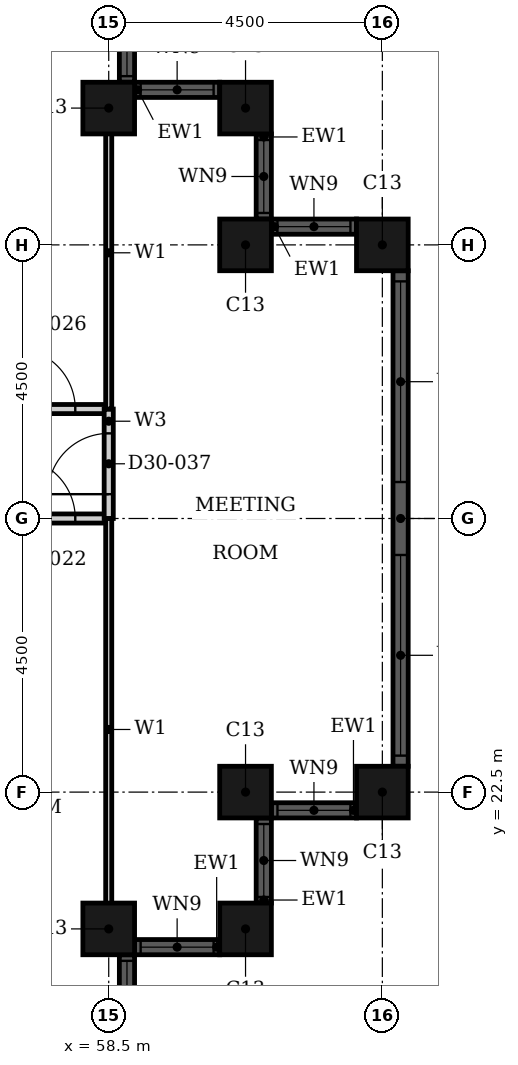
"""IFC4 building model, lengths in metres.
Left out: names, types, materials, properties, quantities, classifications, styles, units other than length and angle.
Written with IfcOpenShell. Run it as: python <this file> out.ifc"""

import sys

from ifc_helpers import new_model, si_unit, direction, frame, frame_2d, origin, origin_2d, place, context, subcontext, project, spatial, rectangle, hollow_rectangle, extrude, element, fill, save


model = new_model("IFC4")
c1 = context("Model", 3, precision=1e-05, world=origin(), true_north=direction((0.0, 1.0)))
c2 = subcontext(c1, "Body", "Model", "MODEL_VIEW")
j1 = project(units=[si_unit("LENGTHUNIT", "METRE"), si_unit("PLANEANGLEUNIT", "RADIAN")], contexts=[c1])
p1 = place(None, origin())
s1 = spatial("IfcSite", under=j1, at=p1, CompositionType="ELEMENT")
p2 = place(p1, origin())
s2 = spatial("IfcBuilding", under=s1, at=p2, CompositionType="ELEMENT")
p3 = place(p2, frame((0.0, 0.0, 122.4)))
s3 = spatial("IfcBuildingStorey", under=s2, at=p3, CompositionType="ELEMENT", Elevation=122.4)
for number, where, z_axis, x_axis in (
    (1, (58.5, 20.25, 0.0), (0.0, 0.0, 1.0), (1.0, 0.0, 0.0)),
    (2, (60.75, 20.25, 0.0), (0.0, 0.0, 1.0), (1.0, 0.0, 0.0)),
    (3, (60.75, 22.5, 0.0), (0.0, 0.0, 1.0), (1.0, 0.0, 0.0)),
    (4, (63.0, 22.5, 0.0), (0.0, 0.0, 1.0), (1.0, 0.0, 0.0)),
    (5, (63.0, 31.5, 0.0), (0.0, 0.0, 1.0), (1.0, 0.0, 0.0)),
    (6, (60.75, 31.5, 0.0), (0.0, 0.0, 1.0), (1.0, 0.0, 0.0)),
    (7, (60.75, 33.75, 0.0), (0.0, 0.0, 1.0), (1.0, 0.0, 0.0)),
    (8, (58.5, 33.75, 0.0), (0.0, 0.0, 1.0), (1.0, 0.0, 0.0)),
):
    element("IfcColumn", number, at=place(p3, frame(where, z_axis=z_axis, x_axis=x_axis)), inside=s3, PredefinedType="COLUMN", context=c2, shape_type="SweptSolid", body=[
        extrude(hollow_rectangle(XDim=0.85, YDim=0.85, WallThickness=0.026, at=origin_2d()), origin(), (0.0, 0.0, 1.0), 3.6),
    ])
p4 = place(p3, frame((58.8, 18.425, 0.0), z_axis=(0.0, 0.0, 1.0), x_axis=(0.0, 1.0, 0.0)))
e9 = element("IfcWall", 9, at=p4, inside=s3, PredefinedType="SOLIDWALL", context=c2, shape_type="SweptSolid", body=[
    extrude(rectangle(XDim=1.4, YDim=0.25, at=frame_2d((0.7, 0.0))), origin(), (0.0, 0.0, 1.0), 3.6),
])
p5 = place(p4, frame((0.1, 0.0, 0.9)))
e10 = element("IfcOpeningElement", 10, at=p5, cuts=e9, PredefinedType="OPENING", context=c2, shape_type="SweptSolid", body=[
    extrude(rectangle(XDim=1.2, YDim=2.08, at=frame_2d((0.6, 1.04))), frame((0.0, 0.135, 0.0), z_axis=(0.0, -1.0, 0.0), x_axis=(1.0, 0.0, 0.0)), (0.0, 0.0, 1.0), 0.27),
])
p6 = place(p3, frame((58.925, 19.95, 0.0), z_axis=(0.0, 0.0, 1.0), x_axis=(1.0, 0.0, 0.0)))
e11 = element("IfcWall", 11, at=p6, inside=s3, PredefinedType="SOLIDWALL", context=c2, shape_type="SweptSolid", body=[
    extrude(rectangle(XDim=1.4, YDim=0.25, at=frame_2d((0.7, 0.0))), origin(), (0.0, 0.0, 1.0), 3.6),
])
p7 = place(p6, frame((0.1, 0.0, 0.9)))
e12 = element("IfcOpeningElement", 12, at=p7, cuts=e11, PredefinedType="OPENING", context=c2, shape_type="SweptSolid", body=[
    extrude(rectangle(XDim=1.2, YDim=2.08, at=frame_2d((0.6, 1.04))), frame((0.0, 0.135, 0.0), z_axis=(0.0, -1.0, 0.0), x_axis=(1.0, 0.0, 0.0)), (0.0, 0.0, 1.0), 0.27),
])
p8 = place(p3, frame((61.05, 20.675, 0.0), z_axis=(0.0, 0.0, 1.0), x_axis=(0.0, 1.0, 0.0)))
e13 = element("IfcWall", 13, at=p8, inside=s3, PredefinedType="SOLIDWALL", context=c2, shape_type="SweptSolid", body=[
    extrude(rectangle(XDim=1.4, YDim=0.25, at=frame_2d((0.7, 0.0))), origin(), (0.0, 0.0, 1.0), 3.6),
])
p9 = place(p8, frame((0.1, 0.0, 0.9)))
e14 = element("IfcOpeningElement", 14, at=p9, cuts=e13, PredefinedType="OPENING", context=c2, shape_type="SweptSolid", body=[
    extrude(rectangle(XDim=1.2, YDim=2.08, at=frame_2d((0.6, 1.04))), frame((0.0, 0.135, 0.0), z_axis=(0.0, -1.0, 0.0), x_axis=(1.0, 0.0, 0.0)), (0.0, 0.0, 1.0), 0.27),
])
p10 = place(p3, frame((61.175, 22.2, 0.0), z_axis=(0.0, 0.0, 1.0), x_axis=(1.0, 0.0, 0.0)))
e15 = element("IfcWall", 15, at=p10, inside=s3, PredefinedType="SOLIDWALL", context=c2, shape_type="SweptSolid", body=[
    extrude(rectangle(XDim=1.4, YDim=0.25, at=frame_2d((0.7, 0.0))), origin(), (0.0, 0.0, 1.0), 3.6),
])
p11 = place(p10, frame((0.1, 0.0, 0.9)))
e16 = element("IfcOpeningElement", 16, at=p11, cuts=e15, PredefinedType="OPENING", context=c2, shape_type="SweptSolid", body=[
    extrude(rectangle(XDim=1.2, YDim=2.08, at=frame_2d((0.6, 1.04))), frame((0.0, 0.135, 0.0), z_axis=(0.0, -1.0, 0.0), x_axis=(1.0, 0.0, 0.0)), (0.0, 0.0, 1.0), 0.27),
])
p12 = place(p3, frame((63.3, 22.925, 0.0), z_axis=(0.0, 0.0, 1.0), x_axis=(0.0, 1.0, 0.0)))
e17 = element("IfcWall", 17, at=p12, inside=s3, PredefinedType="SOLIDWALL", context=c2, shape_type="SweptSolid", body=[
    extrude(rectangle(XDim=8.15, YDim=0.25, at=frame_2d((4.075, 0.0))), origin(), (0.0, 0.0, 1.0), 3.6),
])
p13 = place(p12, frame((0.175, 0.0, 0.9)))
e18 = element("IfcOpeningElement", 18, at=p13, cuts=e17, PredefinedType="OPENING", context=c2, shape_type="SweptSolid", body=[
    extrude(rectangle(XDim=3.3, YDim=2.08, at=frame_2d((1.65, 1.04))), frame((0.0, 0.135, 0.0), z_axis=(0.0, -1.0, 0.0), x_axis=(1.0, 0.0, 0.0)), (0.0, 0.0, 1.0), 0.27),
])
p14 = place(p12, frame((4.675, 0.0, 0.9)))
e19 = element("IfcOpeningElement", 19, at=p14, cuts=e17, PredefinedType="OPENING", context=c2, shape_type="SweptSolid", body=[
    extrude(rectangle(XDim=3.3, YDim=2.08, at=frame_2d((1.65, 1.04))), frame((0.0, 0.135, 0.0), z_axis=(0.0, -1.0, 0.0), x_axis=(1.0, 0.0, 0.0)), (0.0, 0.0, 1.0), 0.27),
])
p15 = place(p3, frame((62.575, 31.8, 0.0), z_axis=(0.0, 0.0, 1.0), x_axis=(-1.0, 0.0, 0.0)))
e20 = element("IfcWall", 20, at=p15, inside=s3, PredefinedType="SOLIDWALL", context=c2, shape_type="SweptSolid", body=[
    extrude(rectangle(XDim=1.4, YDim=0.25, at=frame_2d((0.7, 0.0))), origin(), (0.0, 0.0, 1.0), 3.6),
])
p16 = place(p15, frame((0.1, 0.0, 0.9)))
e21 = element("IfcOpeningElement", 21, at=p16, cuts=e20, PredefinedType="OPENING", context=c2, shape_type="SweptSolid", body=[
    extrude(rectangle(XDim=1.2, YDim=2.08, at=frame_2d((0.6, 1.04))), frame((0.0, 0.135, 0.0), z_axis=(0.0, -1.0, 0.0), x_axis=(1.0, 0.0, 0.0)), (0.0, 0.0, 1.0), 0.27),
])
p17 = place(p3, frame((61.05, 31.925, 0.0), z_axis=(0.0, 0.0, 1.0), x_axis=(0.0, 1.0, 0.0)))
e22 = element("IfcWall", 22, at=p17, inside=s3, PredefinedType="SOLIDWALL", context=c2, shape_type="SweptSolid", body=[
    extrude(rectangle(XDim=1.4, YDim=0.25, at=frame_2d((0.7, 0.0))), origin(), (0.0, 0.0, 1.0), 3.6),
])
p18 = place(p17, frame((0.1, 0.0, 0.9)))
e23 = element("IfcOpeningElement", 23, at=p18, cuts=e22, PredefinedType="OPENING", context=c2, shape_type="SweptSolid", body=[
    extrude(rectangle(XDim=1.2, YDim=2.08, at=frame_2d((0.6, 1.04))), frame((0.0, 0.135, 0.0), z_axis=(0.0, -1.0, 0.0), x_axis=(1.0, 0.0, 0.0)), (0.0, 0.0, 1.0), 0.27),
])
p19 = place(p3, frame((60.325, 34.05, 0.0), z_axis=(0.0, 0.0, 1.0), x_axis=(-1.0, 0.0, 0.0)))
e24 = element("IfcWall", 24, at=p19, inside=s3, PredefinedType="SOLIDWALL", context=c2, shape_type="SweptSolid", body=[
    extrude(rectangle(XDim=1.4, YDim=0.25, at=frame_2d((0.7, 0.0))), origin(), (0.0, 0.0, 1.0), 3.6),
])
p20 = place(p19, frame((0.1, 0.0, 0.9)))
e25 = element("IfcOpeningElement", 25, at=p20, cuts=e24, PredefinedType="OPENING", context=c2, shape_type="SweptSolid", body=[
    extrude(rectangle(XDim=1.2, YDim=2.08, at=frame_2d((0.6, 1.04))), frame((0.0, 0.135, 0.0), z_axis=(0.0, -1.0, 0.0), x_axis=(1.0, 0.0, 0.0)), (0.0, 0.0, 1.0), 0.27),
])
p21 = place(p3, frame((58.8, 34.175, 0.0), z_axis=(0.0, 0.0, 1.0), x_axis=(0.0, 1.0, 0.0)))
e26 = element("IfcWall", 26, at=p21, inside=s3, PredefinedType="SOLIDWALL", context=c2, shape_type="SweptSolid", body=[
    extrude(rectangle(XDim=1.4, YDim=0.25, at=frame_2d((0.7, 0.0))), origin(), (0.0, 0.0, 1.0), 3.6),
])
p22 = place(p21, frame((0.1, 0.0, 0.9)))
e27 = element("IfcOpeningElement", 27, at=p22, cuts=e26, PredefinedType="OPENING", context=c2, shape_type="SweptSolid", body=[
    extrude(rectangle(XDim=1.2, YDim=2.08, at=frame_2d((0.6, 1.04))), frame((0.0, 0.135, 0.0), z_axis=(0.0, -1.0, 0.0), x_axis=(1.0, 0.0, 0.0)), (0.0, 0.0, 1.0), 0.27),
])
p23 = place(p3, frame((46.8, 27.0, 0.0), z_axis=(0.0, 0.0, 1.0), x_axis=(1.0, 0.0, 0.0)))
e28 = element("IfcWall", 28, at=p23, inside=s3, PredefinedType="PARTITIONING", context=c2, shape_type="SweptSolid", body=[
    extrude(rectangle(XDim=11.7, YDim=0.15, at=frame_2d((5.85, 0.0))), origin(), (0.0, 0.0, 1.0), 2.58),
])
p24 = place(p23, frame((5.65, 0.0, 0.0)))
e29 = element("IfcOpeningElement", 29, at=p24, cuts=e28, PredefinedType="OPENING", context=c2, shape_type="SweptSolid", body=[
    extrude(rectangle(XDim=1.0, YDim=2.1, at=frame_2d((0.5, 1.05))), frame((0.0, 0.085, 0.0), z_axis=(0.0, -1.0, 0.0), x_axis=(1.0, 0.0, 0.0)), (0.0, 0.0, 1.0), 0.17),
])
p25 = place(p23, frame((10.15, 0.0, 0.0)))
e30 = element("IfcOpeningElement", 30, at=p25, cuts=e28, PredefinedType="OPENING", context=c2, shape_type="SweptSolid", body=[
    extrude(rectangle(XDim=1.0, YDim=2.1, at=frame_2d((0.5, 1.05))), frame((0.0, 0.085, 0.0), z_axis=(0.0, -1.0, 0.0), x_axis=(1.0, 0.0, 0.0)), (0.0, 0.0, 1.0), 0.17),
])
p26 = place(p3, frame((46.8, 28.8, 0.0), z_axis=(0.0, 0.0, 1.0), x_axis=(1.0, 0.0, 0.0)))
e31 = element("IfcWall", 31, at=p26, inside=s3, PredefinedType="PARTITIONING", context=c2, shape_type="SweptSolid", body=[
    extrude(rectangle(XDim=11.7, YDim=0.15, at=frame_2d((5.85, 0.0))), origin(), (0.0, 0.0, 1.0), 3.3),
])
p27 = place(p26, frame((5.65, 0.0, 0.0)))
e32 = element("IfcOpeningElement", 32, at=p27, cuts=e31, PredefinedType="OPENING", context=c2, shape_type="SweptSolid", body=[
    extrude(rectangle(XDim=1.0, YDim=2.1, at=frame_2d((0.5, 1.05))), frame((0.0, 0.085, 0.0), z_axis=(0.0, -1.0, 0.0), x_axis=(1.0, 0.0, 0.0)), (0.0, 0.0, 1.0), 0.17),
])
p28 = place(p26, frame((10.15, 0.0, 0.0)))
e33 = element("IfcOpeningElement", 33, at=p28, cuts=e31, PredefinedType="OPENING", context=c2, shape_type="SweptSolid", body=[
    extrude(rectangle(XDim=1.0, YDim=2.1, at=frame_2d((0.5, 1.05))), frame((0.0, 0.085, 0.0), z_axis=(0.0, -1.0, 0.0), x_axis=(1.0, 0.0, 0.0)), (0.0, 0.0, 1.0), 0.17),
])
p29 = place(p3, frame((58.5, 27.0, 0.0), z_axis=(0.0, 0.0, 1.0), x_axis=(0.0, 1.0, 0.0)))
e34 = element("IfcWall", 34, at=p29, inside=s3, PredefinedType="PARTITIONING", context=c2, shape_type="SweptSolid", body=[
    extrude(rectangle(XDim=1.8, YDim=0.15, at=frame_2d((0.9, 0.0))), origin(), (0.0, 0.0, 1.0), 3.3),
])
p30 = place(p29, frame((0.4, 0.0, 0.0)))
e35 = element("IfcOpeningElement", 35, at=p30, cuts=e34, PredefinedType="OPENING", context=c2, shape_type="SweptSolid", body=[
    extrude(rectangle(XDim=1.0, YDim=2.1, at=frame_2d((0.5, 1.05))), frame((0.0, 0.085, 0.0), z_axis=(0.0, -1.0, 0.0), x_axis=(1.0, 0.0, 0.0)), (0.0, 0.0, 1.0), 0.17),
])
p31 = place(p3, frame((58.5, 28.8, 0.0), z_axis=(0.0, 0.0, 1.0), x_axis=(0.0, 1.0, 0.0)))
e36 = element("IfcWall", 36, at=p31, inside=s3, PredefinedType="PARTITIONING", context=c2, shape_type="SweptSolid", body=[
    extrude(rectangle(XDim=5.14, YDim=0.1, at=frame_2d((2.57, 0.0))), origin(), (0.0, 0.0, 1.0), 3.3),
])
p32 = place(p3, frame((58.5, 20.06, 0.0), z_axis=(0.0, 0.0, 1.0), x_axis=(0.0, 1.0, 0.0)))
e37 = element("IfcWall", 37, at=p32, inside=s3, PredefinedType="PARTITIONING", context=c2, shape_type="SweptSolid", body=[
    extrude(rectangle(XDim=6.94, YDim=0.1, at=frame_2d((3.47, 0.0))), origin(), (0.0, 0.0, 1.0), 3.3),
])
p33 = place(p5, origin())
e38 = element("IfcWindow", 38, at=p33, inside=s3, PartitioningType="SINGLE_PANEL", PredefinedType="WINDOW", context=c2, shape_type="SweptSolid", body=[
    extrude(rectangle(XDim=1.2, YDim=2.08, at=frame_2d((0.6, 1.04))), frame((0.0, 0.03, 0.0), z_axis=(0.0, -1.0, 0.0), x_axis=(1.0, 0.0, 0.0)), (0.0, 0.0, 1.0), 0.06),
])
fill(e10, e38)
p34 = place(p7, origin())
e39 = element("IfcWindow", 39, at=p34, inside=s3, PartitioningType="SINGLE_PANEL", PredefinedType="WINDOW", context=c2, shape_type="SweptSolid", body=[
    extrude(rectangle(XDim=1.2, YDim=2.08, at=frame_2d((0.6, 1.04))), frame((0.0, 0.03, 0.0), z_axis=(0.0, -1.0, 0.0), x_axis=(1.0, 0.0, 0.0)), (0.0, 0.0, 1.0), 0.06),
])
fill(e12, e39)
p35 = place(p9, origin())
e40 = element("IfcWindow", 40, at=p35, inside=s3, PartitioningType="SINGLE_PANEL", PredefinedType="WINDOW", context=c2, shape_type="SweptSolid", body=[
    extrude(rectangle(XDim=1.2, YDim=2.08, at=frame_2d((0.6, 1.04))), frame((0.0, 0.03, 0.0), z_axis=(0.0, -1.0, 0.0), x_axis=(1.0, 0.0, 0.0)), (0.0, 0.0, 1.0), 0.06),
])
fill(e14, e40)
p36 = place(p11, origin())
e41 = element("IfcWindow", 41, at=p36, inside=s3, PartitioningType="SINGLE_PANEL", PredefinedType="WINDOW", context=c2, shape_type="SweptSolid", body=[
    extrude(rectangle(XDim=1.2, YDim=2.08, at=frame_2d((0.6, 1.04))), frame((0.0, 0.03, 0.0), z_axis=(0.0, -1.0, 0.0), x_axis=(1.0, 0.0, 0.0)), (0.0, 0.0, 1.0), 0.06),
])
fill(e16, e41)
p37 = place(p13, origin())
e42 = element("IfcWindow", 42, at=p37, inside=s3, PartitioningType="SINGLE_PANEL", PredefinedType="WINDOW", context=c2, shape_type="SweptSolid", body=[
    extrude(rectangle(XDim=3.3, YDim=2.08, at=frame_2d((1.65, 1.04))), frame((0.0, 0.03, 0.0), z_axis=(0.0, -1.0, 0.0), x_axis=(1.0, 0.0, 0.0)), (0.0, 0.0, 1.0), 0.06),
])
fill(e18, e42)
p38 = place(p14, origin())
e43 = element("IfcWindow", 43, at=p38, inside=s3, PartitioningType="SINGLE_PANEL", PredefinedType="WINDOW", context=c2, shape_type="SweptSolid", body=[
    extrude(rectangle(XDim=3.3, YDim=2.08, at=frame_2d((1.65, 1.04))), frame((0.0, 0.03, 0.0), z_axis=(0.0, -1.0, 0.0), x_axis=(1.0, 0.0, 0.0)), (0.0, 0.0, 1.0), 0.06),
])
fill(e19, e43)
p39 = place(p16, origin())
e44 = element("IfcWindow", 44, at=p39, inside=s3, PartitioningType="SINGLE_PANEL", PredefinedType="WINDOW", context=c2, shape_type="SweptSolid", body=[
    extrude(rectangle(XDim=1.2, YDim=2.08, at=frame_2d((0.6, 1.04))), frame((0.0, 0.03, 0.0), z_axis=(0.0, -1.0, 0.0), x_axis=(1.0, 0.0, 0.0)), (0.0, 0.0, 1.0), 0.06),
])
fill(e21, e44)
p40 = place(p18, origin())
e45 = element("IfcWindow", 45, at=p40, inside=s3, PartitioningType="SINGLE_PANEL", PredefinedType="WINDOW", context=c2, shape_type="SweptSolid", body=[
    extrude(rectangle(XDim=1.2, YDim=2.08, at=frame_2d((0.6, 1.04))), frame((0.0, 0.03, 0.0), z_axis=(0.0, -1.0, 0.0), x_axis=(1.0, 0.0, 0.0)), (0.0, 0.0, 1.0), 0.06),
])
fill(e23, e45)
p41 = place(p20, origin())
e46 = element("IfcWindow", 46, at=p41, inside=s3, PartitioningType="SINGLE_PANEL", PredefinedType="WINDOW", context=c2, shape_type="SweptSolid", body=[
    extrude(rectangle(XDim=1.2, YDim=2.08, at=frame_2d((0.6, 1.04))), frame((0.0, 0.03, 0.0), z_axis=(0.0, -1.0, 0.0), x_axis=(1.0, 0.0, 0.0)), (0.0, 0.0, 1.0), 0.06),
])
fill(e25, e46)
p42 = place(p22, origin())
e47 = element("IfcWindow", 47, at=p42, inside=s3, PartitioningType="SINGLE_PANEL", PredefinedType="WINDOW", context=c2, shape_type="SweptSolid", body=[
    extrude(rectangle(XDim=1.2, YDim=2.08, at=frame_2d((0.6, 1.04))), frame((0.0, 0.03, 0.0), z_axis=(0.0, -1.0, 0.0), x_axis=(1.0, 0.0, 0.0)), (0.0, 0.0, 1.0), 0.06),
])
fill(e27, e47)
p43 = place(p25, origin())
e48 = element("IfcDoor", 48, at=p43, inside=s3, OperationType="SINGLE_SWING_RIGHT", PredefinedType="DOOR", context=c2, shape_type="SweptSolid", body=[
    extrude(rectangle(XDim=1.0, YDim=2.1, at=frame_2d((0.5, 1.05))), frame((0.0, 0.025, 0.0), z_axis=(0.0, -1.0, 0.0), x_axis=(1.0, 0.0, 0.0)), (0.0, 0.0, 1.0), 0.05),
])
fill(e30, e48)
p44 = place(p28, origin())
e49 = element("IfcDoor", 49, at=p44, inside=s3, OperationType="SINGLE_SWING_RIGHT", PredefinedType="DOOR", context=c2, shape_type="SweptSolid", body=[
    extrude(rectangle(XDim=1.0, YDim=2.1, at=frame_2d((0.5, 1.05))), frame((0.0, 0.025, 0.0), z_axis=(0.0, -1.0, 0.0), x_axis=(1.0, 0.0, 0.0)), (0.0, 0.0, 1.0), 0.05),
])
fill(e33, e49)
p45 = place(p30, origin())
e50 = element("IfcDoor", 50, at=p45, inside=s3, OperationType="SINGLE_SWING_LEFT", PredefinedType="DOOR", context=c2, shape_type="SweptSolid", body=[
    extrude(rectangle(XDim=1.0, YDim=2.1, at=frame_2d((0.5, 1.05))), frame((0.0, 0.025, 0.0), z_axis=(0.0, -1.0, 0.0), x_axis=(1.0, 0.0, 0.0)), (0.0, 0.0, 1.0), 0.05),
])
fill(e35, e50)
save(model, sys.argv[1])
